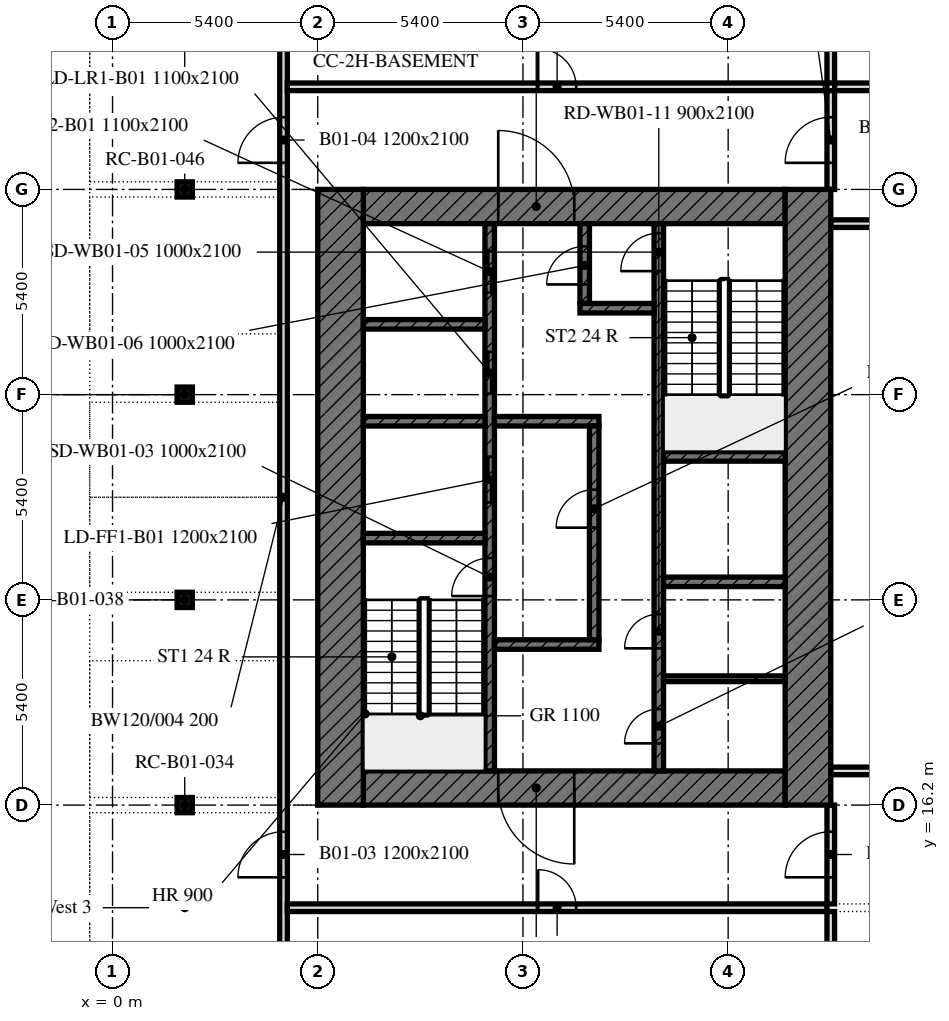
"""IFC4 building model, lengths in metres.
Left out: names, types, materials, properties, quantities, classifications, styles, units other than length and angle.
Written with IfcOpenShell. Run it as: python <this file> out.ifc"""

import sys

from ifc_helpers import new_model, si_unit, direction, frame, frame_2d, origin, origin_2d, place, context, subcontext, project, spatial, rectangle, extrude, element, fill, save


model = new_model("IFC4")
c1 = context("Model", 3, precision=1e-05, world=origin(), true_north=direction((0.0, 1.0)))
c2 = subcontext(c1, "Body", "Model", "MODEL_VIEW")
j1 = project(units=[si_unit("LENGTHUNIT", "METRE"), si_unit("PLANEANGLEUNIT", "RADIAN")], contexts=[c1])
p1 = place(None, origin())
s1 = spatial("IfcSite", under=j1, at=p1, CompositionType="ELEMENT")
p2 = place(p1, origin())
s2 = spatial("IfcBuilding", under=s1, at=p2, CompositionType="ELEMENT")
p3 = place(p2, frame((0.0, 0.0, -4.5)))
s3 = spatial("IfcBuildingStorey", under=s2, at=p3, CompositionType="ELEMENT", Elevation=-4.5)
for number, where, z_axis, x_axis in (
    (1, (1.9, 16.2, 0.0), (0.0, 0.0, 1.0), (1.0, 0.0, 0.0)),
    (2, (1.9, 21.6, 0.0), (0.0, 0.0, 1.0), (1.0, 0.0, 0.0)),
    (3, (1.9, 27.0, 0.0), (0.0, 0.0, 1.0), (1.0, 0.0, 0.0)),
    (4, (1.9, 32.4, 0.0), (0.0, 0.0, 1.0), (1.0, 0.0, 0.0)),
):
    element("IfcColumn", number, at=place(p3, frame(where, z_axis=z_axis, x_axis=x_axis)), inside=s3, PredefinedType="COLUMN", context=c2, shape_type="SweptSolid", body=[
        extrude(rectangle(XDim=0.4, YDim=0.4, at=origin_2d()), origin(), (0.0, 0.0, 1.0), 4.0),
    ])
p4 = place(p3, frame((4.5, 4.4, 0.0), z_axis=(0.0, 0.0, 1.0), x_axis=(0.0, 1.0, 0.0)))
e5 = element("IfcWall", 5, at=p4, inside=s3, PredefinedType="PARTITIONING", context=c2, shape_type="SweptSolid", body=[
    extrude(rectangle(XDim=39.8, YDim=0.2, at=frame_2d((19.9, 0.0))), origin(), (0.0, 0.0, 1.0), 4.0),
])
p5 = place(p4, frame((9.9, 0.0, 0.0)))
e6 = element("IfcOpeningElement", 6, at=p5, cuts=e5, PredefinedType="OPENING", context=c2, shape_type="SweptSolid", body=[
    extrude(rectangle(XDim=1.2, YDim=2.1, at=frame_2d((0.6, 1.05))), frame((0.0, 0.11, 0.0), z_axis=(0.0, -1.0, 0.0), x_axis=(1.0, 0.0, 0.0)), (0.0, 0.0, 1.0), 0.22),
])
p6 = place(p4, frame((28.7, 0.0, 0.0)))
e7 = element("IfcOpeningElement", 7, at=p6, cuts=e5, PredefinedType="OPENING", context=c2, shape_type="SweptSolid", body=[
    extrude(rectangle(XDim=1.2, YDim=2.1, at=frame_2d((0.6, 1.05))), frame((0.0, 0.11, 0.0), z_axis=(0.0, -1.0, 0.0), x_axis=(1.0, 0.0, 0.0)), (0.0, 0.0, 1.0), 0.22),
])
p7 = place(p3, frame((18.9, 4.6, 0.0), z_axis=(0.0, 0.0, 1.0), x_axis=(0.0, 1.0, 0.0)))
e8 = element("IfcWall", 8, at=p7, inside=s3, PredefinedType="PARTITIONING", context=c2, shape_type="SweptSolid", body=[
    extrude(rectangle(XDim=8.8, YDim=0.2, at=frame_2d((4.4, 0.0))), origin(), (0.0, 0.0, 1.0), 4.0),
])
p8 = place(p3, frame((18.9, 35.2, 0.0), z_axis=(0.0, 0.0, 1.0), x_axis=(0.0, 1.0, 0.0)))
e9 = element("IfcWall", 9, at=p8, inside=s3, PredefinedType="PARTITIONING", context=c2, shape_type="SweptSolid", body=[
    extrude(rectangle(XDim=8.8, YDim=0.2, at=frame_2d((4.4, 0.0))), origin(), (0.0, 0.0, 1.0), 4.0),
])
p9 = place(p3, frame((4.6, 13.5, 0.0), z_axis=(0.0, 0.0, 1.0), x_axis=(1.0, 0.0, 0.0)))
e10 = element("IfcWall", 10, at=p9, inside=s3, PredefinedType="PARTITIONING", context=c2, shape_type="SweptSolid", body=[
    extrude(rectangle(XDim=14.2, YDim=0.2, at=frame_2d((7.1, 0.0))), origin(), (0.0, 0.0, 1.0), 4.0),
])
p10 = place(p9, frame((6.6, 0.0, 0.0)))
e11 = element("IfcOpeningElement", 11, at=p10, cuts=e10, PredefinedType="OPENING", context=c2, shape_type="SweptSolid", body=[
    extrude(rectangle(XDim=1.0, YDim=2.1, at=frame_2d((0.5, 1.05))), frame((0.0, 0.11, 0.0), z_axis=(0.0, -1.0, 0.0), x_axis=(1.0, 0.0, 0.0)), (0.0, 0.0, 1.0), 0.22),
])
p11 = place(p3, frame((4.6, 35.1, 0.0), z_axis=(0.0, 0.0, 1.0), x_axis=(1.0, 0.0, 0.0)))
e12 = element("IfcWall", 12, at=p11, inside=s3, PredefinedType="PARTITIONING", context=c2, shape_type="SweptSolid", body=[
    extrude(rectangle(XDim=14.2, YDim=0.2, at=frame_2d((7.1, 0.0))), origin(), (0.0, 0.0, 1.0), 4.0),
])
p12 = place(p11, frame((6.6, 0.0, 0.0)))
e13 = element("IfcOpeningElement", 13, at=p12, cuts=e12, PredefinedType="OPENING", context=c2, shape_type="SweptSolid", body=[
    extrude(rectangle(XDim=1.0, YDim=2.1, at=frame_2d((0.5, 1.05))), frame((0.0, 0.11, 0.0), z_axis=(0.0, -1.0, 0.0), x_axis=(1.0, 0.0, 0.0)), (0.0, 0.0, 1.0), 0.22),
])
p13 = place(p3, frame((19.0, 35.1, 0.0), z_axis=(0.0, 0.0, 1.0), x_axis=(1.0, 0.0, 0.0)))
e14 = element("IfcWall", 14, at=p13, inside=s3, PredefinedType="PARTITIONING", context=c2, shape_type="SweptSolid", body=[
    extrude(rectangle(XDim=5.2, YDim=0.2, at=frame_2d((2.6, 0.0))), origin(), (0.0, 0.0, 1.0), 4.0),
])
p14 = place(p13, frame((2.1, 0.0, 0.0)))
e15 = element("IfcOpeningElement", 15, at=p14, cuts=e14, PredefinedType="OPENING", context=c2, shape_type="SweptSolid", body=[
    extrude(rectangle(XDim=1.0, YDim=2.1, at=frame_2d((0.5, 1.05))), frame((0.0, 0.11, 0.0), z_axis=(0.0, -1.0, 0.0), x_axis=(1.0, 0.0, 0.0)), (0.0, 0.0, 1.0), 0.22),
])
p15 = place(p3, frame((18.9, 13.6, 0.0), z_axis=(0.0, 0.0, 1.0), x_axis=(0.0, 1.0, 0.0)))
e16 = element("IfcWall", 16, at=p15, inside=s3, PredefinedType="PARTITIONING", context=c2, shape_type="SweptSolid", body=[
    extrude(rectangle(XDim=2.6, YDim=0.2, at=frame_2d((1.3, 0.0))), origin(), (0.0, 0.0, 1.0), 4.0),
])
p16 = place(p15, frame((0.7, 0.0, 0.0)))
e17 = element("IfcOpeningElement", 17, at=p16, cuts=e16, PredefinedType="OPENING", context=c2, shape_type="SweptSolid", body=[
    extrude(rectangle(XDim=1.2, YDim=2.1, at=frame_2d((0.6, 1.05))), frame((0.0, 0.11, 0.0), z_axis=(0.0, -1.0, 0.0), x_axis=(1.0, 0.0, 0.0)), (0.0, 0.0, 1.0), 0.22),
])
p17 = place(p3, frame((18.9, 32.4, 0.0), z_axis=(0.0, 0.0, 1.0), x_axis=(0.0, 1.0, 0.0)))
e18 = element("IfcWall", 18, at=p17, inside=s3, PredefinedType="PARTITIONING", context=c2, shape_type="SweptSolid", body=[
    extrude(rectangle(XDim=2.6, YDim=0.2, at=frame_2d((1.3, 0.0))), origin(), (0.0, 0.0, 1.0), 4.0),
])
p18 = place(p17, frame((0.7, 0.0, 0.0)))
e19 = element("IfcOpeningElement", 19, at=p18, cuts=e18, PredefinedType="OPENING", context=c2, shape_type="SweptSolid", body=[
    extrude(rectangle(XDim=1.2, YDim=2.1, at=frame_2d((0.6, 1.05))), frame((0.0, 0.11, 0.0), z_axis=(0.0, -1.0, 0.0), x_axis=(1.0, 0.0, 0.0)), (0.0, 0.0, 1.0), 0.22),
])
p19 = place(p3, frame((18.9, 17.1, 0.0), z_axis=(0.0, 0.0, 1.0), x_axis=(1.0, 0.0, 0.0)))
e20 = element("IfcWall", 20, at=p19, inside=s3, PredefinedType="PARTITIONING", context=c2, shape_type="SweptSolid", body=[
    extrude(rectangle(XDim=10.8, YDim=0.2, at=frame_2d((5.4, 0.0))), origin(), (0.0, 0.0, 1.0), 4.0),
])
p20 = place(p19, frame((4.9, 0.0, 0.0)))
e21 = element("IfcOpeningElement", 21, at=p20, cuts=e20, PredefinedType="OPENING", context=c2, shape_type="SweptSolid", body=[
    extrude(rectangle(XDim=1.0, YDim=2.1, at=frame_2d((0.5, 1.05))), frame((0.0, 0.11, 0.0), z_axis=(0.0, -1.0, 0.0), x_axis=(1.0, 0.0, 0.0)), (0.0, 0.0, 1.0), 0.22),
])
p21 = place(p3, frame((18.9, 31.5, 0.0), z_axis=(0.0, 0.0, 1.0), x_axis=(1.0, 0.0, 0.0)))
e22 = element("IfcWall", 22, at=p21, inside=s3, PredefinedType="PARTITIONING", context=c2, shape_type="SweptSolid", body=[
    extrude(rectangle(XDim=10.8, YDim=0.2, at=frame_2d((5.4, 0.0))), origin(), (0.0, 0.0, 1.0), 4.0),
])
p22 = place(p3, frame((17.7, 16.65, 0.0), z_axis=(0.0, 0.0, 1.0), x_axis=(-1.0, 0.0, 0.0)))
e23 = element("IfcWall", 23, at=p22, inside=s3, PredefinedType="SOLIDWALL", context=c2, shape_type="SweptSolid", body=[
    extrude(rectangle(XDim=11.1, YDim=0.9, at=frame_2d((5.55, 0.0))), origin(), (0.0, 0.0, 1.0), 4.0),
])
p23 = place(p22, frame((5.55, 0.0, 0.0)))
e24 = element("IfcOpeningElement", 24, at=p23, cuts=e23, PredefinedType="OPENING", context=c2, shape_type="SweptSolid", body=[
    extrude(rectangle(XDim=2.0, YDim=2.4, at=frame_2d((1.0, 1.2))), frame((0.0, 0.45, 0.0), z_axis=(0.0, -1.0, 0.0), x_axis=(1.0, 0.0, 0.0)), (0.0, 0.0, 1.0), 0.9),
])
p24 = place(p3, frame((6.6, 31.95, 0.0), z_axis=(0.0, 0.0, 1.0), x_axis=(1.0, 0.0, 0.0)))
e25 = element("IfcWall", 25, at=p24, inside=s3, PredefinedType="SOLIDWALL", context=c2, shape_type="SweptSolid", body=[
    extrude(rectangle(XDim=11.1, YDim=0.9, at=frame_2d((5.55, 0.0))), origin(), (0.0, 0.0, 1.0), 4.0),
])
p25 = place(p24, frame((3.55, 0.0, 0.0)))
e26 = element("IfcOpeningElement", 26, at=p25, cuts=e25, PredefinedType="OPENING", context=c2, shape_type="SweptSolid", body=[
    extrude(rectangle(XDim=2.0, YDim=2.4, at=frame_2d((1.0, 1.2))), frame((0.0, 0.45, 0.0), z_axis=(0.0, -1.0, 0.0), x_axis=(1.0, 0.0, 0.0)), (0.0, 0.0, 1.0), 0.9),
])
for number, where, z_axis, x_axis in (
    (27, (6.0, 16.2, 0.0), (0.0, 0.0, 1.0), (0.0, 1.0, 0.0)),
    (28, (18.3, 32.4, 0.0), (0.0, 0.0, 1.0), (0.0, -1.0, 0.0)),
):
    element("IfcWall", number, at=place(p3, frame(where, z_axis=z_axis, x_axis=x_axis)), inside=s3, PredefinedType="SOLIDWALL", context=c2, shape_type="SweptSolid", body=[
        extrude(rectangle(XDim=16.2, YDim=1.2, at=frame_2d((8.1, 0.0))), origin(), (0.0, 0.0, 1.0), 4.0),
    ])
p26 = place(p3, frame((9.925, 17.1, 0.0), z_axis=(0.0, 0.0, 1.0), x_axis=(0.0, 1.0, 0.0)))
e29 = element("IfcWall", 29, at=p26, inside=s3, PredefinedType="SOLIDWALL", context=c2, shape_type="SweptSolid", body=[
    extrude(rectangle(XDim=14.4, YDim=0.25, at=frame_2d((7.2, 0.0))), origin(), (0.0, 0.0, 1.0), 4.0),
])
p27 = place(p26, frame((4.6, 0.0, 0.0)))
e30 = element("IfcOpeningElement", 30, at=p27, cuts=e29, PredefinedType="OPENING", context=c2, shape_type="SweptSolid", body=[
    extrude(rectangle(XDim=1.0, YDim=2.1, at=frame_2d((0.5, 1.05))), frame((0.0, 0.125, 0.0), z_axis=(0.0, -1.0, 0.0), x_axis=(1.0, 0.0, 0.0)), (0.0, 0.0, 1.0), 0.25),
])
p28 = place(p26, frame((7.062, 0.0, 0.0)))
e31 = element("IfcOpeningElement", 31, at=p28, cuts=e29, PredefinedType="OPENING", context=c2, shape_type="SweptSolid", body=[
    extrude(rectangle(XDim=1.2, YDim=2.1, at=frame_2d((0.6, 1.05))), frame((0.0, 0.125, 0.0), z_axis=(0.0, -1.0, 0.0), x_axis=(1.0, 0.0, 0.0)), (0.0, 0.0, 1.0), 0.25),
])
p29 = place(p26, frame((9.925, 0.0, 0.0)))
e32 = element("IfcOpeningElement", 32, at=p29, cuts=e29, PredefinedType="OPENING", context=c2, shape_type="SweptSolid", body=[
    extrude(rectangle(XDim=1.1, YDim=2.1, at=frame_2d((0.55, 1.05))), frame((0.0, 0.125, 0.0), z_axis=(0.0, -1.0, 0.0), x_axis=(1.0, 0.0, 0.0)), (0.0, 0.0, 1.0), 0.25),
])
p30 = place(p26, frame((12.587, 0.0, 0.0)))
e33 = element("IfcOpeningElement", 33, at=p30, cuts=e29, PredefinedType="OPENING", context=c2, shape_type="SweptSolid", body=[
    extrude(rectangle(XDim=1.1, YDim=2.1, at=frame_2d((0.55, 1.05))), frame((0.0, 0.125, 0.0), z_axis=(0.0, -1.0, 0.0), x_axis=(1.0, 0.0, 0.0)), (0.0, 0.0, 1.0), 0.25),
])
p31 = place(p3, frame((14.375, 17.1, 0.0), z_axis=(0.0, 0.0, 1.0), x_axis=(0.0, 1.0, 0.0)))
e34 = element("IfcWall", 34, at=p31, inside=s3, PredefinedType="SOLIDWALL", context=c2, shape_type="SweptSolid", body=[
    extrude(rectangle(XDim=14.4, YDim=0.25, at=frame_2d((7.2, 0.0))), origin(), (0.0, 0.0, 1.0), 4.0),
])
p32 = place(p31, frame((13.15, 0.0, 0.0)))
e35 = element("IfcOpeningElement", 35, at=p32, cuts=e34, PredefinedType="OPENING", context=c2, shape_type="SweptSolid", body=[
    extrude(rectangle(XDim=1.0, YDim=2.1, at=frame_2d((0.5, 1.05))), frame((0.0, 0.125, 0.0), z_axis=(0.0, -1.0, 0.0), x_axis=(1.0, 0.0, 0.0)), (0.0, 0.0, 1.0), 0.25),
])
p33 = place(p31, frame((0.725, 0.0, 0.0)))
e36 = element("IfcOpeningElement", 36, at=p33, cuts=e34, PredefinedType="OPENING", context=c2, shape_type="SweptSolid", body=[
    extrude(rectangle(XDim=0.9, YDim=2.1, at=frame_2d((0.45, 1.05))), frame((0.0, 0.125, 0.0), z_axis=(0.0, -1.0, 0.0), x_axis=(1.0, 0.0, 0.0)), (0.0, 0.0, 1.0), 0.25),
])
p34 = place(p31, frame((3.225, 0.0, 0.0)))
e37 = element("IfcOpeningElement", 37, at=p34, cuts=e34, PredefinedType="OPENING", context=c2, shape_type="SweptSolid", body=[
    extrude(rectangle(XDim=0.9, YDim=2.1, at=frame_2d((0.45, 1.05))), frame((0.0, 0.125, 0.0), z_axis=(0.0, -1.0, 0.0), x_axis=(1.0, 0.0, 0.0)), (0.0, 0.0, 1.0), 0.25),
])
for number, where, z_axis, x_axis in (
    (38, (6.6, 23.225, 0.0), (0.0, 0.0, 1.0), (1.0, 0.0, 0.0)),
    (39, (14.5, 25.375, 0.0), (0.0, 0.0, 1.0), (1.0, 0.0, 0.0)),
    (40, (14.5, 22.075, 0.0), (0.0, 0.0, 1.0), (1.0, 0.0, 0.0)),
    (41, (6.6, 26.3, 0.0), (0.0, 0.0, 1.0), (1.0, 0.0, 0.0)),
):
    element("IfcWall", number, at=place(p3, frame(where, z_axis=z_axis, x_axis=x_axis)), inside=s3, PredefinedType="SOLIDWALL", context=c2, shape_type="SweptSolid", body=[
        extrude(rectangle(XDim=3.2, YDim=0.25, at=frame_2d((1.6, 0.0))), origin(), (0.0, 0.0, 1.0), 4.0),
    ])
for number, where, z_axis, x_axis in (
    (42, (10.05, 26.3, 0.0), (0.0, 0.0, 1.0), (1.0, 0.0, 0.0)),
    (43, (10.05, 20.425, 0.0), (0.0, 0.0, 1.0), (1.0, 0.0, 0.0)),
):
    element("IfcWall", number, at=place(p3, frame(where, z_axis=z_axis, x_axis=x_axis)), inside=s3, PredefinedType="SOLIDWALL", context=c2, shape_type="SweptSolid", body=[
        extrude(rectangle(XDim=2.75, YDim=0.25, at=frame_2d((1.375, 0.0))), origin(), (0.0, 0.0, 1.0), 4.0),
    ])
p35 = place(p3, frame((12.425, 29.4, 0.0), z_axis=(0.0, 0.0, 1.0), x_axis=(0.0, 1.0, 0.0)))
e44 = element("IfcWall", 44, at=p35, inside=s3, PredefinedType="SOLIDWALL", context=c2, shape_type="SweptSolid", body=[
    extrude(rectangle(XDim=2.1, YDim=0.25, at=frame_2d((1.05, 0.0))), origin(), (0.0, 0.0, 1.0), 4.0),
])
p36 = place(p35, frame((0.5, 0.0, 0.0)))
e45 = element("IfcOpeningElement", 45, at=p36, cuts=e44, PredefinedType="OPENING", context=c2, shape_type="SweptSolid", body=[
    extrude(rectangle(XDim=1.0, YDim=2.1, at=frame_2d((0.5, 1.05))), frame((0.0, 0.125, 0.0), z_axis=(0.0, -1.0, 0.0), x_axis=(1.0, 0.0, 0.0)), (0.0, 0.0, 1.0), 0.25),
])
p37 = place(p3, frame((12.3, 29.275, 0.0), z_axis=(0.0, 0.0, 1.0), x_axis=(1.0, 0.0, 0.0)))
e46 = element("IfcWall", 46, at=p37, inside=s3, PredefinedType="SOLIDWALL", context=c2, shape_type="SweptSolid", body=[
    extrude(rectangle(XDim=1.95, YDim=0.25, at=frame_2d((0.975, 0.0))), origin(), (0.0, 0.0, 1.0), 4.0),
])
p38 = place(p3, frame((12.675, 20.55, 0.0), z_axis=(0.0, 0.0, 1.0), x_axis=(0.0, 1.0, 0.0)))
e47 = element("IfcWall", 47, at=p38, inside=s3, PredefinedType="SOLIDWALL", context=c2, shape_type="SweptSolid", body=[
    extrude(rectangle(XDim=5.625, YDim=0.25, at=frame_2d((2.812, 0.0))), origin(), (0.0, 0.0, 1.0), 4.0),
])
p39 = place(p38, frame((2.95, 0.0, 0.0)))
e48 = element("IfcOpeningElement", 48, at=p39, cuts=e47, PredefinedType="OPENING", context=c2, shape_type="SweptSolid", body=[
    extrude(rectangle(XDim=1.0, YDim=2.1, at=frame_2d((0.5, 1.05))), frame((0.0, 0.125, 0.0), z_axis=(0.0, -1.0, 0.0), x_axis=(1.0, 0.0, 0.0)), (0.0, 0.0, 1.0), 0.25),
])
p40 = place(p3, frame((6.6, 28.85, 0.0), z_axis=(0.0, 0.0, 1.0), x_axis=(1.0, 0.0, 0.0)))
e49 = element("IfcWall", 49, at=p40, inside=s3, PredefinedType="SOLIDWALL", context=c2, shape_type="SweptSolid", body=[
    extrude(rectangle(XDim=3.2, YDim=0.25, at=frame_2d((1.6, 0.0))), origin(), (0.0, 0.0, 1.0), 4.0),
])
p41 = place(p3, frame((14.5, 19.525, 0.0), z_axis=(0.0, 0.0, 1.0), x_axis=(1.0, 0.0, 0.0)))
e50 = element("IfcWall", 50, at=p41, inside=s3, PredefinedType="PARTITIONING", context=c2, shape_type="SweptSolid", body=[
    extrude(rectangle(XDim=3.2, YDim=0.15, at=frame_2d((1.6, 0.0))), origin(), (0.0, 0.0, 1.0), 4.0),
])
p42 = place(p5, origin())
e51 = element("IfcDoor", 51, at=p42, inside=s3, OperationType="SINGLE_SWING_LEFT", PredefinedType="DOOR", context=c2, shape_type="SweptSolid", body=[
    extrude(rectangle(XDim=1.2, YDim=2.1, at=frame_2d((0.6, 1.05))), frame((0.0, 0.025, 0.0), z_axis=(0.0, -1.0, 0.0), x_axis=(1.0, 0.0, 0.0)), (0.0, 0.0, 1.0), 0.05),
])
fill(e6, e51)
p43 = place(p6, origin())
e52 = element("IfcDoor", 52, at=p43, inside=s3, OperationType="SINGLE_SWING_LEFT", PredefinedType="DOOR", context=c2, shape_type="SweptSolid", body=[
    extrude(rectangle(XDim=1.2, YDim=2.1, at=frame_2d((0.6, 1.05))), frame((0.0, 0.025, 0.0), z_axis=(0.0, -1.0, 0.0), x_axis=(1.0, 0.0, 0.0)), (0.0, 0.0, 1.0), 0.05),
])
fill(e7, e52)
p44 = place(p10, origin())
e53 = element("IfcDoor", 53, at=p44, inside=s3, OperationType="SINGLE_SWING_LEFT", PredefinedType="DOOR", context=c2, shape_type="SweptSolid", body=[
    extrude(rectangle(XDim=1.0, YDim=2.1, at=frame_2d((0.5, 1.05))), frame((0.0, 0.025, 0.0), z_axis=(0.0, -1.0, 0.0), x_axis=(1.0, 0.0, 0.0)), (0.0, 0.0, 1.0), 0.05),
])
fill(e11, e53)
p45 = place(p12, origin())
e54 = element("IfcDoor", 54, at=p45, inside=s3, OperationType="SINGLE_SWING_LEFT", PredefinedType="DOOR", context=c2, shape_type="SweptSolid", body=[
    extrude(rectangle(XDim=1.0, YDim=2.1, at=frame_2d((0.5, 1.05))), frame((0.0, 0.025, 0.0), z_axis=(0.0, -1.0, 0.0), x_axis=(1.0, 0.0, 0.0)), (0.0, 0.0, 1.0), 0.05),
])
fill(e13, e54)
p46 = place(p16, origin())
e55 = element("IfcDoor", 55, at=p46, inside=s3, OperationType="SINGLE_SWING_LEFT", PredefinedType="DOOR", context=c2, shape_type="SweptSolid", body=[
    extrude(rectangle(XDim=1.2, YDim=2.1, at=frame_2d((0.6, 1.05))), frame((0.0, 0.025, 0.0), z_axis=(0.0, -1.0, 0.0), x_axis=(1.0, 0.0, 0.0)), (0.0, 0.0, 1.0), 0.05),
])
fill(e17, e55)
p47 = place(p18, origin())
e56 = element("IfcDoor", 56, at=p47, inside=s3, OperationType="SINGLE_SWING_LEFT", PredefinedType="DOOR", context=c2, shape_type="SweptSolid", body=[
    extrude(rectangle(XDim=1.2, YDim=2.1, at=frame_2d((0.6, 1.05))), frame((0.0, 0.025, 0.0), z_axis=(0.0, -1.0, 0.0), x_axis=(1.0, 0.0, 0.0)), (0.0, 0.0, 1.0), 0.05),
])
fill(e19, e56)
p48 = place(p23, origin())
e57 = element("IfcDoor", 57, at=p48, inside=s3, OperationType="DOUBLE_DOOR_SINGLE_SWING", PredefinedType="DOOR", context=c2, shape_type="SweptSolid", body=[
    extrude(rectangle(XDim=2.0, YDim=2.4, at=frame_2d((1.0, 1.2))), frame((0.0, 0.025, 0.0), z_axis=(0.0, -1.0, 0.0), x_axis=(1.0, 0.0, 0.0)), (0.0, 0.0, 1.0), 0.05),
])
fill(e24, e57)
p49 = place(p25, origin())
e58 = element("IfcDoor", 58, at=p49, inside=s3, OperationType="DOUBLE_DOOR_SINGLE_SWING", PredefinedType="DOOR", context=c2, shape_type="SweptSolid", body=[
    extrude(rectangle(XDim=2.0, YDim=2.4, at=frame_2d((1.0, 1.2))), frame((0.0, 0.025, 0.0), z_axis=(0.0, -1.0, 0.0), x_axis=(1.0, 0.0, 0.0)), (0.0, 0.0, 1.0), 0.05),
])
fill(e26, e58)
p50 = place(p27, origin())
e59 = element("IfcDoor", 59, at=p50, inside=s3, OperationType="SINGLE_SWING_LEFT", PredefinedType="DOOR", context=c2, shape_type="SweptSolid", body=[
    extrude(rectangle(XDim=1.0, YDim=2.1, at=frame_2d((0.5, 1.05))), frame((0.0, 0.025, 0.0), z_axis=(0.0, -1.0, 0.0), x_axis=(1.0, 0.0, 0.0)), (0.0, 0.0, 1.0), 0.05),
])
fill(e30, e59)
p51 = place(p39, origin())
e60 = element("IfcDoor", 60, at=p51, inside=s3, OperationType="SINGLE_SWING_LEFT", PredefinedType="DOOR", context=c2, shape_type="SweptSolid", body=[
    extrude(rectangle(XDim=1.0, YDim=2.1, at=frame_2d((0.5, 1.05))), frame((0.0, 0.025, 0.0), z_axis=(0.0, -1.0, 0.0), x_axis=(1.0, 0.0, 0.0)), (0.0, 0.0, 1.0), 0.05),
])
fill(e48, e60)
p52 = place(p32, origin())
e61 = element("IfcDoor", 61, at=p52, inside=s3, OperationType="SINGLE_SWING_LEFT", PredefinedType="DOOR", context=c2, shape_type="SweptSolid", body=[
    extrude(rectangle(XDim=1.0, YDim=2.1, at=frame_2d((0.5, 1.05))), frame((0.0, 0.025, 0.0), z_axis=(0.0, -1.0, 0.0), x_axis=(1.0, 0.0, 0.0)), (0.0, 0.0, 1.0), 0.05),
])
fill(e35, e61)
p53 = place(p36, origin())
e62 = element("IfcDoor", 62, at=p53, inside=s3, OperationType="SINGLE_SWING_LEFT", PredefinedType="DOOR", context=c2, shape_type="SweptSolid", body=[
    extrude(rectangle(XDim=1.0, YDim=2.1, at=frame_2d((0.5, 1.05))), frame((0.0, 0.025, 0.0), z_axis=(0.0, -1.0, 0.0), x_axis=(1.0, 0.0, 0.0)), (0.0, 0.0, 1.0), 0.05),
])
fill(e45, e62)
p54 = place(p28, origin())
e63 = element("IfcDoor", 63, at=p54, inside=s3, OperationType="DOUBLE_DOOR_SLIDING", PredefinedType="DOOR", context=c2, shape_type="SweptSolid", body=[
    extrude(rectangle(XDim=1.2, YDim=2.1, at=frame_2d((0.6, 1.05))), frame((0.0, 0.025, 0.0), z_axis=(0.0, -1.0, 0.0), x_axis=(1.0, 0.0, 0.0)), (0.0, 0.0, 1.0), 0.05),
])
fill(e31, e63)
p55 = place(p29, origin())
e64 = element("IfcDoor", 64, at=p55, inside=s3, OperationType="DOUBLE_DOOR_SLIDING", PredefinedType="DOOR", context=c2, shape_type="SweptSolid", body=[
    extrude(rectangle(XDim=1.1, YDim=2.1, at=frame_2d((0.55, 1.05))), frame((0.0, 0.025, 0.0), z_axis=(0.0, -1.0, 0.0), x_axis=(1.0, 0.0, 0.0)), (0.0, 0.0, 1.0), 0.05),
])
fill(e32, e64)
p56 = place(p30, origin())
e65 = element("IfcDoor", 65, at=p56, inside=s3, OperationType="DOUBLE_DOOR_SLIDING", PredefinedType="DOOR", context=c2, shape_type="SweptSolid", body=[
    extrude(rectangle(XDim=1.1, YDim=2.1, at=frame_2d((0.55, 1.05))), frame((0.0, 0.025, 0.0), z_axis=(0.0, -1.0, 0.0), x_axis=(1.0, 0.0, 0.0)), (0.0, 0.0, 1.0), 0.05),
])
fill(e33, e65)
p57 = place(p33, origin())
e66 = element("IfcDoor", 66, at=p57, inside=s3, OperationType="SINGLE_SWING_LEFT", PredefinedType="DOOR", context=c2, shape_type="SweptSolid", body=[
    extrude(rectangle(XDim=0.9, YDim=2.1, at=frame_2d((0.45, 1.05))), frame((0.0, 0.025, 0.0), z_axis=(0.0, -1.0, 0.0), x_axis=(1.0, 0.0, 0.0)), (0.0, 0.0, 1.0), 0.05),
])
fill(e36, e66)
p58 = place(p34, origin())
e67 = element("IfcDoor", 67, at=p58, inside=s3, OperationType="SINGLE_SWING_LEFT", PredefinedType="DOOR", context=c2, shape_type="SweptSolid", body=[
    extrude(rectangle(XDim=0.9, YDim=2.1, at=frame_2d((0.45, 1.05))), frame((0.0, 0.025, 0.0), z_axis=(0.0, -1.0, 0.0), x_axis=(1.0, 0.0, 0.0)), (0.0, 0.0, 1.0), 0.05),
])
fill(e37, e67)
save(model, sys.argv[1])
